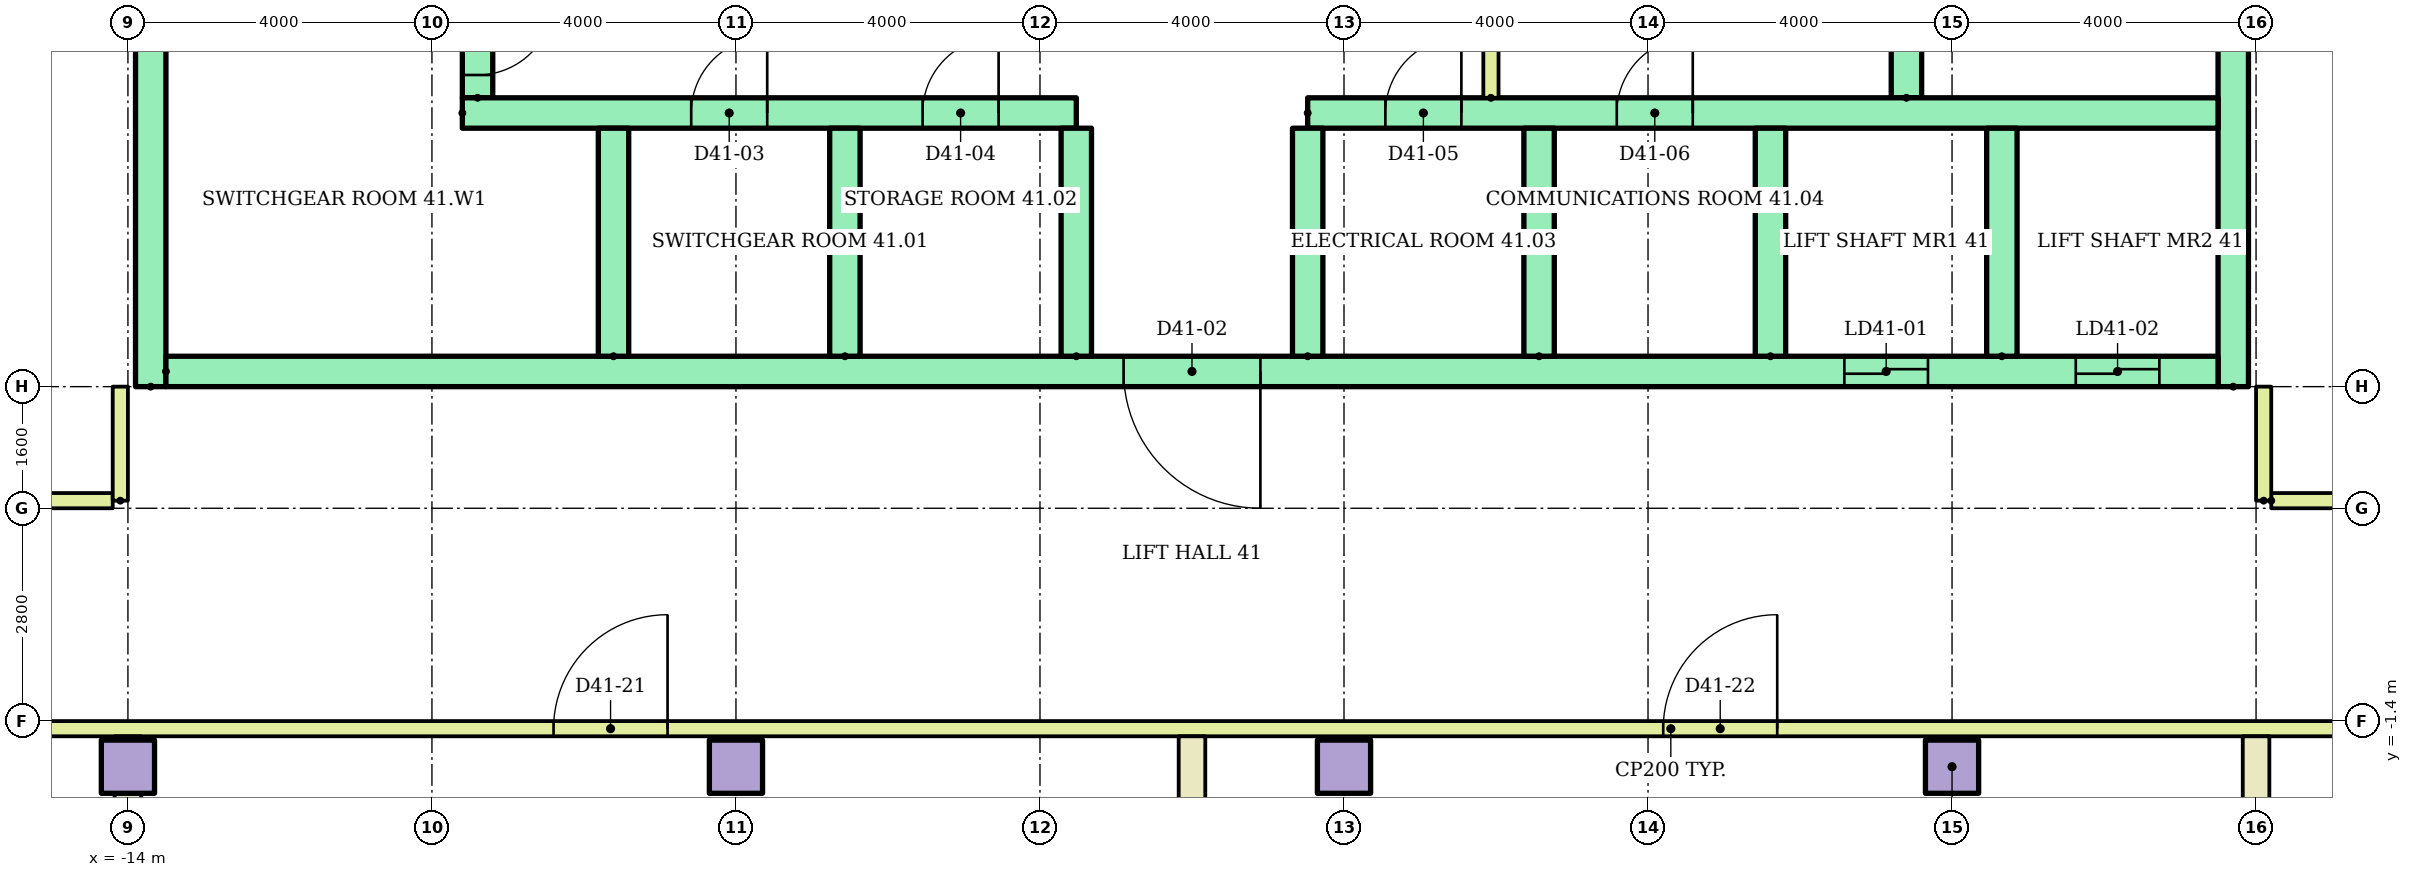
"""IFC4 building model, lengths in metres.
Left out: names, types, materials, properties, quantities, classifications, styles, units other than length and angle.
Written with IfcOpenShell. Run it as: python <this file> out.ifc"""

import sys

from ifc_helpers import new_model, si_unit, direction, frame, frame_2d, origin, origin_2d, place, context, subcontext, project, spatial, rectangle, extrude, element, fill, save


model = new_model("IFC4")
c1 = context("Model", 3, precision=1e-05, world=origin(), true_north=direction((0.0, 1.0)))
c2 = subcontext(c1, "Body", "Model", "MODEL_VIEW")
j1 = project(units=[si_unit("LENGTHUNIT", "METRE"), si_unit("PLANEANGLEUNIT", "RADIAN")], contexts=[c1])
p1 = place(None, origin())
s1 = spatial("IfcSite", under=j1, at=p1, CompositionType="ELEMENT")
p2 = place(p1, origin())
s2 = spatial("IfcBuilding", under=s1, at=p2, CompositionType="ELEMENT")
p3 = place(p2, frame((0.0, 0.0, 161.4)))
s3 = spatial("IfcBuildingStorey", under=s2, at=p3, CompositionType="ELEMENT", Elevation=161.4)
for number, where in (
    (1, (-14.0, -2.0, 0.0)),
    (2, (-6.0, -2.0, 0.0)),
    (3, (2.0, -2.0, 0.0)),
    (4, (10.0, -2.0, 0.0)),
):
    element("IfcColumn", number, at=place(p3, frame(where)), inside=s3, PredefinedType="COLUMN", context=c2, shape_type="SweptSolid", body=[
        extrude(rectangle(XDim=0.7, YDim=0.7, at=origin_2d()), origin(), (0.0, 0.0, 1.0), 3.9),
    ])
for number, where, z_axis, x_axis in (
    (5, (-13.7, 3.0, 0.0), (0.0, 0.0, 1.0), (0.0, 1.0, 0.0)),
    (6, (13.7, 3.0, 0.0), (0.0, 0.0, 1.0), (0.0, 1.0, 0.0)),
):
    element("IfcWall", number, at=place(p3, frame(where, z_axis=z_axis, x_axis=x_axis)), inside=s3, PredefinedType="SHEAR", context=c2, shape_type="SweptSolid", body=[
        extrude(rectangle(XDim=17.0, YDim=0.4, at=frame_2d((8.5, 0.0))), origin(), (0.0, 0.0, 1.0), 3.62),
    ])
p4 = place(p3, frame((-9.4, 6.8, 0.0), z_axis=(0.0, 0.0, 1.0), x_axis=(0.0, 1.0, 0.0)))
e7 = element("IfcWall", 7, at=p4, inside=s3, PredefinedType="SHEAR", context=c2, shape_type="SweptSolid", body=[
    extrude(rectangle(XDim=12.7, YDim=0.4, at=frame_2d((6.35, 0.0))), origin(), (0.0, 0.0, 1.0), 3.62),
])
p5 = place(p4, frame((0.3, 0.0, 0.0)))
e8 = element("IfcOpeningElement", 8, at=p5, cuts=e7, PredefinedType="OPENING", context=c2, shape_type="SweptSolid", body=[
    extrude(rectangle(XDim=1.0, YDim=2.1, at=frame_2d((0.5, 1.05))), frame((0.0, 0.21, 0.0), z_axis=(0.0, -1.0, 0.0), x_axis=(1.0, 0.0, 0.0)), (0.0, 0.0, 1.0), 0.42),
])
p6 = place(p4, frame((2.05, 0.0, 0.0)))
e9 = element("IfcOpeningElement", 9, at=p6, cuts=e7, PredefinedType="OPENING", context=c2, shape_type="SweptSolid", body=[
    extrude(rectangle(XDim=1.0, YDim=2.1, at=frame_2d((0.5, 1.05))), frame((0.0, 0.21, 0.0), z_axis=(0.0, -1.0, 0.0), x_axis=(1.0, 0.0, 0.0)), (0.0, 0.0, 1.0), 0.42),
])
p7 = place(p4, frame((7.925, 0.0, 0.0)))
e10 = element("IfcOpeningElement", 10, at=p7, cuts=e7, PredefinedType="OPENING", context=c2, shape_type="SweptSolid", body=[
    extrude(rectangle(XDim=1.0, YDim=2.1, at=frame_2d((0.5, 1.05))), frame((0.0, 0.21, 0.0), z_axis=(0.0, -1.0, 0.0), x_axis=(1.0, 0.0, 0.0)), (0.0, 0.0, 1.0), 0.42),
])
p8 = place(p3, frame((9.4, 6.8, 0.0), z_axis=(0.0, 0.0, 1.0), x_axis=(0.0, 1.0, 0.0)))
e11 = element("IfcWall", 11, at=p8, inside=s3, PredefinedType="SHEAR", context=c2, shape_type="SweptSolid", body=[
    extrude(rectangle(XDim=12.7, YDim=0.4, at=frame_2d((6.35, 0.0))), origin(), (0.0, 0.0, 1.0), 3.62),
])
p9 = place(p8, frame((1.15, 0.0, 0.0)))
e12 = element("IfcOpeningElement", 12, at=p9, cuts=e11, PredefinedType="OPENING", context=c2, shape_type="SweptSolid", body=[
    extrude(rectangle(XDim=1.0, YDim=2.1, at=frame_2d((0.5, 1.05))), frame((0.0, 0.21, 0.0), z_axis=(0.0, -1.0, 0.0), x_axis=(1.0, 0.0, 0.0)), (0.0, 0.0, 1.0), 0.42),
])
p10 = place(p8, frame((7.925, 0.0, 0.0)))
e13 = element("IfcOpeningElement", 13, at=p10, cuts=e11, PredefinedType="OPENING", context=c2, shape_type="SweptSolid", body=[
    extrude(rectangle(XDim=1.0, YDim=2.1, at=frame_2d((0.5, 1.05))), frame((0.0, 0.21, 0.0), z_axis=(0.0, -1.0, 0.0), x_axis=(1.0, 0.0, 0.0)), (0.0, 0.0, 1.0), 0.42),
])
p11 = place(p3, frame((-13.5, 3.2, 0.0)))
e14 = element("IfcWall", 14, at=p11, inside=s3, PredefinedType="SHEAR", context=c2, shape_type="SweptSolid", body=[
    extrude(rectangle(XDim=27.0, YDim=0.4, at=frame_2d((13.5, 0.0))), origin(), (0.0, 0.0, 1.0), 3.62),
])
p12 = place(p11, frame((22.083, 0.0, 0.0)))
e15 = element("IfcOpeningElement", 15, at=p12, cuts=e14, PredefinedType="OPENING", context=c2, shape_type="SweptSolid", body=[
    extrude(rectangle(XDim=1.1, YDim=2.1, at=frame_2d((0.55, 1.05))), frame((0.0, 0.21, 0.0), z_axis=(0.0, -1.0, 0.0), x_axis=(1.0, 0.0, 0.0)), (0.0, 0.0, 1.0), 0.42),
])
p13 = place(p11, frame((25.128, 0.0, 0.0)))
e16 = element("IfcOpeningElement", 16, at=p13, cuts=e14, PredefinedType="OPENING", context=c2, shape_type="SweptSolid", body=[
    extrude(rectangle(XDim=1.1, YDim=2.1, at=frame_2d((0.55, 1.05))), frame((0.0, 0.21, 0.0), z_axis=(0.0, -1.0, 0.0), x_axis=(1.0, 0.0, 0.0)), (0.0, 0.0, 1.0), 0.42),
])
p14 = place(p11, frame((12.6, 0.0, 0.0)))
e17 = element("IfcOpeningElement", 17, at=p14, cuts=e14, PredefinedType="OPENING", context=c2, shape_type="SweptSolid", body=[
    extrude(rectangle(XDim=1.8, YDim=2.1, at=frame_2d((0.9, 1.05))), frame((0.0, 0.21, 0.0), z_axis=(0.0, -1.0, 0.0), x_axis=(1.0, 0.0, 0.0)), (0.0, 0.0, 1.0), 0.42),
])
p15 = place(p3, frame((-9.6, 6.6, 0.0)))
e18 = element("IfcWall", 18, at=p15, inside=s3, PredefinedType="SHEAR", context=c2, shape_type="SweptSolid", body=[
    extrude(rectangle(XDim=8.078, YDim=0.4, at=frame_2d((4.039, 0.0))), origin(), (0.0, 0.0, 1.0), 3.62),
])
p16 = place(p15, frame((3.011, 0.0, 0.0)))
e19 = element("IfcOpeningElement", 19, at=p16, cuts=e18, PredefinedType="OPENING", context=c2, shape_type="SweptSolid", body=[
    extrude(rectangle(XDim=1.0, YDim=2.1, at=frame_2d((0.5, 1.05))), frame((0.0, 0.21, 0.0), z_axis=(0.0, -1.0, 0.0), x_axis=(1.0, 0.0, 0.0)), (0.0, 0.0, 1.0), 0.42),
])
p17 = place(p15, frame((6.056, 0.0, 0.0)))
e20 = element("IfcOpeningElement", 20, at=p17, cuts=e18, PredefinedType="OPENING", context=c2, shape_type="SweptSolid", body=[
    extrude(rectangle(XDim=1.0, YDim=2.1, at=frame_2d((0.5, 1.05))), frame((0.0, 0.21, 0.0), z_axis=(0.0, -1.0, 0.0), x_axis=(1.0, 0.0, 0.0)), (0.0, 0.0, 1.0), 0.42),
])
p18 = place(p3, frame((1.522, 6.6, 0.0)))
e21 = element("IfcWall", 21, at=p18, inside=s3, PredefinedType="SHEAR", context=c2, shape_type="SweptSolid", body=[
    extrude(rectangle(XDim=11.978, YDim=0.4, at=frame_2d((5.989, 0.0))), origin(), (0.0, 0.0, 1.0), 3.62),
])
p19 = place(p18, frame((1.022, 0.0, 0.0)))
e22 = element("IfcOpeningElement", 22, at=p19, cuts=e21, PredefinedType="OPENING", context=c2, shape_type="SweptSolid", body=[
    extrude(rectangle(XDim=1.0, YDim=2.1, at=frame_2d((0.5, 1.05))), frame((0.0, 0.21, 0.0), z_axis=(0.0, -1.0, 0.0), x_axis=(1.0, 0.0, 0.0)), (0.0, 0.0, 1.0), 0.42),
])
p20 = place(p18, frame((4.067, 0.0, 0.0)))
e23 = element("IfcOpeningElement", 23, at=p20, cuts=e21, PredefinedType="OPENING", context=c2, shape_type="SweptSolid", body=[
    extrude(rectangle(XDim=1.0, YDim=2.1, at=frame_2d((0.5, 1.05))), frame((0.0, 0.21, 0.0), z_axis=(0.0, -1.0, 0.0), x_axis=(1.0, 0.0, 0.0)), (0.0, 0.0, 1.0), 0.42),
])
for number, where, z_axis, x_axis in (
    (24, (-7.611, 3.4, 0.0), (0.0, 0.0, 1.0), (0.0, 1.0, 0.0)),
    (25, (-4.567, 3.4, 0.0), (0.0, 0.0, 1.0), (0.0, 1.0, 0.0)),
    (26, (-1.522, 3.4, 0.0), (0.0, 0.0, 1.0), (0.0, 1.0, 0.0)),
    (27, (1.522, 3.4, 0.0), (0.0, 0.0, 1.0), (0.0, 1.0, 0.0)),
    (28, (4.567, 3.4, 0.0), (0.0, 0.0, 1.0), (0.0, 1.0, 0.0)),
    (29, (7.611, 3.4, 0.0), (0.0, 0.0, 1.0), (0.0, 1.0, 0.0)),
    (30, (10.656, 3.4, 0.0), (0.0, 0.0, 1.0), (0.0, 1.0, 0.0)),
):
    element("IfcWall", number, at=place(p3, frame(where, z_axis=z_axis, x_axis=x_axis)), inside=s3, PredefinedType="SHEAR", context=c2, shape_type="SweptSolid", body=[
        extrude(rectangle(XDim=3.0, YDim=0.4, at=frame_2d((1.5, 0.0))), origin(), (0.0, 0.0, 1.0), 3.62),
    ])
p21 = place(p3, frame((3.933, 6.8, 0.0), z_axis=(0.0, 0.0, 1.0), x_axis=(0.0, 1.0, 0.0)))
e31 = element("IfcWall", 31, at=p21, inside=s3, PredefinedType="PARTITIONING", context=c2, shape_type="SweptSolid", body=[
    extrude(rectangle(XDim=3.3, YDim=0.2, at=frame_2d((1.65, 0.0))), origin(), (0.0, 0.0, 1.0), 3.62),
])
p22 = place(p21, frame((1.1, 0.0, 0.0)))
e32 = element("IfcOpeningElement", 32, at=p22, cuts=e31, PredefinedType="OPENING", context=c2, shape_type="SweptSolid", body=[
    extrude(rectangle(XDim=1.1, YDim=2.1, at=frame_2d((0.55, 1.05))), frame((0.0, 0.11, 0.0), z_axis=(0.0, -1.0, 0.0), x_axis=(1.0, 0.0, 0.0)), (0.0, 0.0, 1.0), 0.22),
])
p23 = place(p3, frame((-24.6, -1.5, 0.0)))
e33 = element("IfcWall", 33, at=p23, inside=s3, PredefinedType="PARTITIONING", context=c2, shape_type="SweptSolid", body=[
    extrude(rectangle(XDim=61.8, YDim=0.2, at=frame_2d((30.9, 0.0))), origin(), (0.0, 0.0, 1.0), 3.62),
])
p24 = place(p23, frame((4.8, 0.0, 0.0)))
e34 = element("IfcOpeningElement", 34, at=p24, cuts=e33, PredefinedType="OPENING", context=c2, shape_type="SweptSolid", body=[
    extrude(rectangle(XDim=1.6, YDim=2.4, at=frame_2d((0.8, 1.2))), frame((0.0, 0.11, 0.0), z_axis=(0.0, -1.0, 0.0), x_axis=(1.0, 0.0, 0.0)), (0.0, 0.0, 1.0), 0.22),
])
p25 = place(p23, frame((16.2, 0.0, 0.0)))
e35 = element("IfcOpeningElement", 35, at=p25, cuts=e33, PredefinedType="OPENING", context=c2, shape_type="SweptSolid", body=[
    extrude(rectangle(XDim=1.5, YDim=2.1, at=frame_2d((0.75, 1.05))), frame((0.0, 0.11, 0.0), z_axis=(0.0, -1.0, 0.0), x_axis=(1.0, 0.0, 0.0)), (0.0, 0.0, 1.0), 0.22),
])
p26 = place(p23, frame((30.8, 0.0, 0.0)))
e36 = element("IfcOpeningElement", 36, at=p26, cuts=e33, PredefinedType="OPENING", context=c2, shape_type="SweptSolid", body=[
    extrude(rectangle(XDim=1.5, YDim=2.1, at=frame_2d((0.75, 1.05))), frame((0.0, 0.11, 0.0), z_axis=(0.0, -1.0, 0.0), x_axis=(1.0, 0.0, 0.0)), (0.0, 0.0, 1.0), 0.22),
])
p27 = place(p23, frame((45.8, 0.0, 0.0)))
e37 = element("IfcOpeningElement", 37, at=p27, cuts=e33, PredefinedType="OPENING", context=c2, shape_type="SweptSolid", body=[
    extrude(rectangle(XDim=1.0, YDim=2.4, at=frame_2d((0.5, 1.2))), frame((0.0, 0.11, 0.0), z_axis=(0.0, -1.0, 0.0), x_axis=(1.0, 0.0, 0.0)), (0.0, 0.0, 1.0), 0.22),
])
p28 = place(p3, frame((-24.6, 1.5, 0.0)))
e38 = element("IfcWall", 38, at=p28, inside=s3, PredefinedType="PARTITIONING", context=c2, shape_type="SweptSolid", body=[
    extrude(rectangle(XDim=10.4, YDim=0.2, at=frame_2d((5.2, 0.0))), origin(), (0.0, 0.0, 1.0), 3.62),
])
p29 = place(p28, frame((4.6, 0.0, 0.0)))
e39 = element("IfcOpeningElement", 39, at=p29, cuts=e38, PredefinedType="OPENING", context=c2, shape_type="SweptSolid", body=[
    extrude(rectangle(XDim=1.6, YDim=2.4, at=frame_2d((0.8, 1.2))), frame((0.0, 0.11, 0.0), z_axis=(0.0, -1.0, 0.0), x_axis=(1.0, 0.0, 0.0)), (0.0, 0.0, 1.0), 0.22),
])
p30 = place(p3, frame((14.2, 1.5, 0.0)))
e40 = element("IfcWall", 40, at=p30, inside=s3, PredefinedType="PARTITIONING", context=c2, shape_type="SweptSolid", body=[
    extrude(rectangle(XDim=23.0, YDim=0.2, at=frame_2d((11.5, 0.0))), origin(), (0.0, 0.0, 1.0), 3.62),
])
p31 = place(p30, frame((10.0, 0.0, 0.0)))
e41 = element("IfcOpeningElement", 41, at=p31, cuts=e40, PredefinedType="OPENING", context=c2, shape_type="SweptSolid", body=[
    extrude(rectangle(XDim=1.0, YDim=2.4, at=frame_2d((0.5, 1.2))), frame((0.0, 0.11, 0.0), z_axis=(0.0, -1.0, 0.0), x_axis=(1.0, 0.0, 0.0)), (0.0, 0.0, 1.0), 0.22),
])
for number, where, z_axis, x_axis in (
    (42, (-14.1, 1.5, 0.0), (0.0, 0.0, 1.0), (0.0, 1.0, 0.0)),
    (43, (14.1, 1.5, 0.0), (0.0, 0.0, 1.0), (0.0, 1.0, 0.0)),
):
    element("IfcWall", number, at=place(p3, frame(where, z_axis=z_axis, x_axis=x_axis)), inside=s3, PredefinedType="PARTITIONING", context=c2, shape_type="SweptSolid", body=[
        extrude(rectangle(XDim=1.5, YDim=0.2, at=frame_2d((0.75, 0.0))), origin(), (0.0, 0.0, 1.0), 3.62),
    ])
p32 = place(p3, frame((-14.0, -16.5, 0.0), z_axis=(0.0, 0.0, 1.0), x_axis=(0.0, 1.0, 0.0)))
e44 = element("IfcWall", 44, at=p32, inside=s3, PredefinedType="PARTITIONING", context=c2, shape_type="SweptSolid", body=[
    extrude(rectangle(XDim=14.9, YDim=0.35, at=frame_2d((7.45, 0.0))), origin(), (0.0, 0.0, 1.0), 3.62),
])
for number, where, z_axis, x_axis in (
    (45, (0.0, -16.8, 0.0), (0.0, 0.0, 1.0), (0.0, 1.0, 0.0)),
    (46, (14.0, -16.8, 0.0), (0.0, 0.0, 1.0), (0.0, 1.0, 0.0)),
):
    element("IfcWall", number, at=place(p3, frame(where, z_axis=z_axis, x_axis=x_axis)), inside=s3, PredefinedType="PARTITIONING", context=c2, shape_type="SweptSolid", body=[
        extrude(rectangle(XDim=15.2, YDim=0.35, at=frame_2d((7.6, 0.0))), origin(), (0.0, 0.0, 1.0), 3.62),
    ])
p33 = place(p12, origin())
e47 = element("IfcDoor", 47, at=p33, inside=s3, OperationType="SLIDING_TO_LEFT", PredefinedType="DOOR", context=c2, shape_type="SweptSolid", body=[
    extrude(rectangle(XDim=1.1, YDim=2.1, at=frame_2d((0.55, 1.05))), frame((0.0, 0.025, 0.0), z_axis=(0.0, -1.0, 0.0), x_axis=(1.0, 0.0, 0.0)), (0.0, 0.0, 1.0), 0.05),
])
fill(e15, e47)
p34 = place(p13, origin())
e48 = element("IfcDoor", 48, at=p34, inside=s3, OperationType="SLIDING_TO_LEFT", PredefinedType="DOOR", context=c2, shape_type="SweptSolid", body=[
    extrude(rectangle(XDim=1.1, YDim=2.1, at=frame_2d((0.55, 1.05))), frame((0.0, 0.025, 0.0), z_axis=(0.0, -1.0, 0.0), x_axis=(1.0, 0.0, 0.0)), (0.0, 0.0, 1.0), 0.05),
])
fill(e16, e48)
p35 = place(p14, frame((1.8, 0.0, 0.0), z_axis=(0.0, 0.0, 1.0), x_axis=(-1.0, 0.0, 0.0)))
e49 = element("IfcDoor", 49, at=p35, inside=s3, OperationType="DOUBLE_DOOR_SINGLE_SWING", PredefinedType="DOOR", context=c2, shape_type="SweptSolid", body=[
    extrude(rectangle(XDim=1.8, YDim=2.1, at=frame_2d((0.9, 1.05))), frame((0.0, 0.025, 0.0), z_axis=(0.0, -1.0, 0.0), x_axis=(1.0, 0.0, 0.0)), (0.0, 0.0, 1.0), 0.05),
])
fill(e17, e49)
p36 = place(p16, origin())
e50 = element("IfcDoor", 50, at=p36, inside=s3, OperationType="SINGLE_SWING_RIGHT", PredefinedType="DOOR", context=c2, shape_type="SweptSolid", body=[
    extrude(rectangle(XDim=1.0, YDim=2.1, at=frame_2d((0.5, 1.05))), frame((0.0, 0.025, 0.0), z_axis=(0.0, -1.0, 0.0), x_axis=(1.0, 0.0, 0.0)), (0.0, 0.0, 1.0), 0.05),
])
fill(e19, e50)
p37 = place(p17, origin())
e51 = element("IfcDoor", 51, at=p37, inside=s3, OperationType="SINGLE_SWING_RIGHT", PredefinedType="DOOR", context=c2, shape_type="SweptSolid", body=[
    extrude(rectangle(XDim=1.0, YDim=2.1, at=frame_2d((0.5, 1.05))), frame((0.0, 0.025, 0.0), z_axis=(0.0, -1.0, 0.0), x_axis=(1.0, 0.0, 0.0)), (0.0, 0.0, 1.0), 0.05),
])
fill(e20, e51)
p38 = place(p19, origin())
e52 = element("IfcDoor", 52, at=p38, inside=s3, OperationType="SINGLE_SWING_RIGHT", PredefinedType="DOOR", context=c2, shape_type="SweptSolid", body=[
    extrude(rectangle(XDim=1.0, YDim=2.1, at=frame_2d((0.5, 1.05))), frame((0.0, 0.025, 0.0), z_axis=(0.0, -1.0, 0.0), x_axis=(1.0, 0.0, 0.0)), (0.0, 0.0, 1.0), 0.05),
])
fill(e22, e52)
p39 = place(p20, origin())
e53 = element("IfcDoor", 53, at=p39, inside=s3, OperationType="SINGLE_SWING_RIGHT", PredefinedType="DOOR", context=c2, shape_type="SweptSolid", body=[
    extrude(rectangle(XDim=1.0, YDim=2.1, at=frame_2d((0.5, 1.05))), frame((0.0, 0.025, 0.0), z_axis=(0.0, -1.0, 0.0), x_axis=(1.0, 0.0, 0.0)), (0.0, 0.0, 1.0), 0.05),
])
fill(e23, e53)
p40 = place(p5, frame((1.0, 0.0, 0.0), z_axis=(0.0, 0.0, 1.0), x_axis=(-1.0, 0.0, 0.0)))
e54 = element("IfcDoor", 54, at=p40, inside=s3, OperationType="SINGLE_SWING_RIGHT", PredefinedType="DOOR", context=c2, shape_type="SweptSolid", body=[
    extrude(rectangle(XDim=1.0, YDim=2.1, at=frame_2d((0.5, 1.05))), frame((0.0, 0.025, 0.0), z_axis=(0.0, -1.0, 0.0), x_axis=(1.0, 0.0, 0.0)), (0.0, 0.0, 1.0), 0.05),
])
fill(e8, e54)
p41 = place(p25, origin())
e55 = element("IfcDoor", 55, at=p41, inside=s3, OperationType="DOUBLE_DOOR_SINGLE_SWING", PredefinedType="DOOR", context=c2, shape_type="SweptSolid", body=[
    extrude(rectangle(XDim=1.5, YDim=2.1, at=frame_2d((0.75, 1.05))), frame((0.0, 0.025, 0.0), z_axis=(0.0, -1.0, 0.0), x_axis=(1.0, 0.0, 0.0)), (0.0, 0.0, 1.0), 0.05),
])
fill(e35, e55)
p42 = place(p26, origin())
e56 = element("IfcDoor", 56, at=p42, inside=s3, OperationType="DOUBLE_DOOR_SINGLE_SWING", PredefinedType="DOOR", context=c2, shape_type="SweptSolid", body=[
    extrude(rectangle(XDim=1.5, YDim=2.1, at=frame_2d((0.75, 1.05))), frame((0.0, 0.025, 0.0), z_axis=(0.0, -1.0, 0.0), x_axis=(1.0, 0.0, 0.0)), (0.0, 0.0, 1.0), 0.05),
])
fill(e36, e56)
save(model, sys.argv[1])
